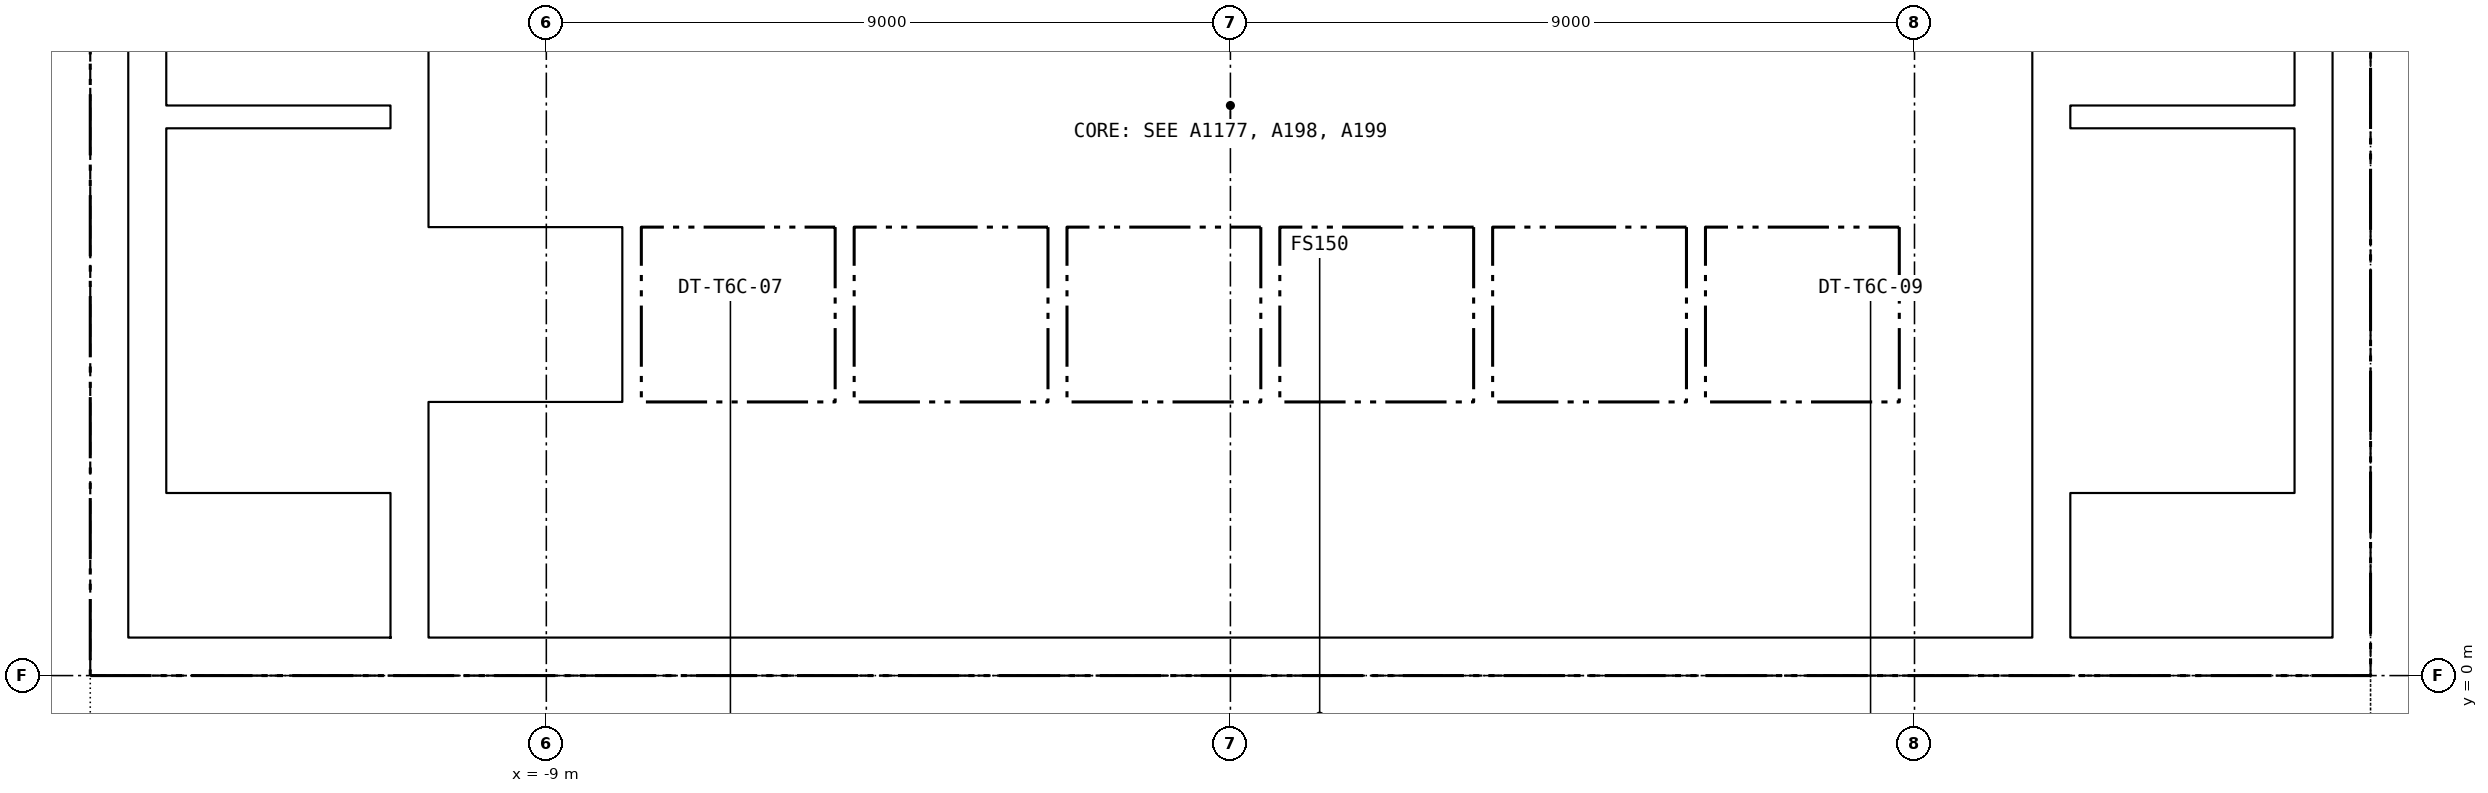
"""IFC4 building model, lengths in metres.
Left out: names, types, materials, properties, quantities, classifications, styles, units other than length and angle.
Written with IfcOpenShell. Run it as: python <this file> out.ifc"""

import sys

from ifc_helpers import new_model, si_unit, direction, frame, frame_2d, origin, place, context, subcontext, project, spatial, rectangle, extrude, element, fill, save


model = new_model("IFC4")
c1 = context("Model", 3, precision=1e-05, world=origin(), true_north=direction((0.0, 1.0)))
c2 = subcontext(c1, "Body", "Model", "MODEL_VIEW")
j1 = project(units=[si_unit("LENGTHUNIT", "METRE"), si_unit("PLANEANGLEUNIT", "RADIAN")], contexts=[c1])
p1 = place(None, origin())
s1 = spatial("IfcSite", under=j1, at=p1, CompositionType="ELEMENT")
p2 = place(p1, origin())
s2 = spatial("IfcBuilding", under=s1, at=p2, CompositionType="ELEMENT")
p3 = place(p2, frame((0.0, 0.0, 282.85)))
s3 = spatial("IfcBuildingStorey", under=s2, at=p3, CompositionType="ELEMENT", Elevation=282.85)
p4 = place(p3, frame((-15.0, 0.25, -0.15), z_axis=(0.0, 0.0, 1.0), x_axis=(1.0, 0.0, 0.0)))
e1 = element("IfcWall", 1, at=p4, inside=s3, PredefinedType="SOLIDWALL", context=c2, shape_type="SweptSolid", body=[
    extrude(rectangle(XDim=30.0, YDim=0.5, at=frame_2d((15.0, 0.0))), origin(), (0.0, 0.0, 1.0), 3.65),
])
p5 = place(p4, frame((5.8, 0.0, 0.15)))
e2 = element("IfcOpeningElement", 2, at=p5, cuts=e1, PredefinedType="OPENING", context=c2, shape_type="SweptSolid", body=[
    extrude(rectangle(XDim=2.4, YDim=2.4, at=frame_2d((1.2, 1.2))), frame((0.0, 0.26, 0.0), z_axis=(0.0, -1.0, 0.0), x_axis=(1.0, 0.0, 0.0)), (0.0, 0.0, 1.0), 0.52),
])
p6 = place(p4, frame((13.8, 0.0, 0.15)))
e3 = element("IfcOpeningElement", 3, at=p6, cuts=e1, PredefinedType="OPENING", context=c2, shape_type="SweptSolid", body=[
    extrude(rectangle(XDim=2.4, YDim=2.4, at=frame_2d((1.2, 1.2))), frame((0.0, 0.26, 0.0), z_axis=(0.0, -1.0, 0.0), x_axis=(1.0, 0.0, 0.0)), (0.0, 0.0, 1.0), 0.52),
])
p7 = place(p4, frame((21.8, 0.0, 0.15)))
e4 = element("IfcOpeningElement", 4, at=p7, cuts=e1, PredefinedType="OPENING", context=c2, shape_type="SweptSolid", body=[
    extrude(rectangle(XDim=2.4, YDim=2.4, at=frame_2d((1.2, 1.2))), frame((0.0, 0.26, 0.0), z_axis=(0.0, -1.0, 0.0), x_axis=(1.0, 0.0, 0.0)), (0.0, 0.0, 1.0), 0.52),
])
p8 = place(p4, frame((1.5, 0.0, 0.15)))
e5 = element("IfcOpeningElement", 5, at=p8, cuts=e1, PredefinedType="OPENING", context=c2, shape_type="SweptSolid", body=[
    extrude(rectangle(XDim=1.2, YDim=2.1, at=frame_2d((0.6, 1.05))), frame((0.0, 0.26, 0.0), z_axis=(0.0, -1.0, 0.0), x_axis=(1.0, 0.0, 0.0)), (0.0, 0.0, 1.0), 0.52),
])
p9 = place(p4, frame((27.3, 0.0, 0.15)))
e6 = element("IfcOpeningElement", 6, at=p9, cuts=e1, PredefinedType="OPENING", context=c2, shape_type="SweptSolid", body=[
    extrude(rectangle(XDim=1.2, YDim=2.1, at=frame_2d((0.6, 1.05))), frame((0.0, 0.26, 0.0), z_axis=(0.0, -1.0, 0.0), x_axis=(1.0, 0.0, 0.0)), (0.0, 0.0, 1.0), 0.52),
])
for number, where, z_axis, x_axis in (
    (7, (-14.75, 0.5, -0.15), (0.0, 0.0, 1.0), (0.0, 1.0, 0.0)),
    (8, (14.75, 0.5, -0.15), (0.0, 0.0, 1.0), (0.0, 1.0, 0.0)),
    (9, (-10.8, 0.5, -0.15), (0.0, 0.0, 1.0), (0.0, 1.0, 0.0)),
    (10, (10.8, 0.5, -0.15), (0.0, 0.0, 1.0), (0.0, 1.0, 0.0)),
):
    element("IfcWall", number, at=place(p3, frame(where, z_axis=z_axis, x_axis=x_axis)), inside=s3, PredefinedType="SOLIDWALL", context=c2, shape_type="SweptSolid", body=[
        extrude(rectangle(XDim=14.0, YDim=0.5, at=frame_2d((7.0, 0.0))), origin(), (0.0, 0.0, 1.0), 3.65),
    ])
p10 = place(p3, frame((-10.55, 3.5, 0.0), z_axis=(0.0, 0.0, 1.0), x_axis=(1.0, 0.0, 0.0)))
e11 = element("IfcWall", 11, at=p10, inside=s3, PredefinedType="PARTITIONING", context=c2, shape_type="SweptSolid", body=[
    extrude(rectangle(XDim=21.1, YDim=0.2, at=frame_2d((10.55, 0.0))), origin(), (0.0, 0.0, 1.0), 3.5),
])
p11 = place(p10, frame((0.675, 0.0, 0.0)))
e12 = element("IfcOpeningElement", 12, at=p11, cuts=e11, PredefinedType="OPENING", context=c2, shape_type="SweptSolid", body=[
    extrude(rectangle(XDim=1.2, YDim=2.1, at=frame_2d((0.6, 1.05))), frame((0.0, 0.11, 0.0), z_axis=(0.0, -1.0, 0.0), x_axis=(1.0, 0.0, 0.0)), (0.0, 0.0, 1.0), 0.22),
])
p12 = place(p10, frame((3.475, 0.0, 0.0)))
e13 = element("IfcOpeningElement", 13, at=p12, cuts=e11, PredefinedType="OPENING", context=c2, shape_type="SweptSolid", body=[
    extrude(rectangle(XDim=1.2, YDim=2.1, at=frame_2d((0.6, 1.05))), frame((0.0, 0.11, 0.0), z_axis=(0.0, -1.0, 0.0), x_axis=(1.0, 0.0, 0.0)), (0.0, 0.0, 1.0), 0.22),
])
p13 = place(p10, frame((6.275, 0.0, 0.0)))
e14 = element("IfcOpeningElement", 14, at=p13, cuts=e11, PredefinedType="OPENING", context=c2, shape_type="SweptSolid", body=[
    extrude(rectangle(XDim=1.2, YDim=2.1, at=frame_2d((0.6, 1.05))), frame((0.0, 0.11, 0.0), z_axis=(0.0, -1.0, 0.0), x_axis=(1.0, 0.0, 0.0)), (0.0, 0.0, 1.0), 0.22),
])
p14 = place(p10, frame((9.075, 0.0, 0.0)))
e15 = element("IfcOpeningElement", 15, at=p14, cuts=e11, PredefinedType="OPENING", context=c2, shape_type="SweptSolid", body=[
    extrude(rectangle(XDim=1.2, YDim=2.1, at=frame_2d((0.6, 1.05))), frame((0.0, 0.11, 0.0), z_axis=(0.0, -1.0, 0.0), x_axis=(1.0, 0.0, 0.0)), (0.0, 0.0, 1.0), 0.22),
])
p15 = place(p10, frame((11.875, 0.0, 0.0)))
e16 = element("IfcOpeningElement", 16, at=p15, cuts=e11, PredefinedType="OPENING", context=c2, shape_type="SweptSolid", body=[
    extrude(rectangle(XDim=1.2, YDim=2.1, at=frame_2d((0.6, 1.05))), frame((0.0, 0.11, 0.0), z_axis=(0.0, -1.0, 0.0), x_axis=(1.0, 0.0, 0.0)), (0.0, 0.0, 1.0), 0.22),
])
p16 = place(p10, frame((14.675, 0.0, 0.0)))
e17 = element("IfcOpeningElement", 17, at=p16, cuts=e11, PredefinedType="OPENING", context=c2, shape_type="SweptSolid", body=[
    extrude(rectangle(XDim=1.2, YDim=2.1, at=frame_2d((0.6, 1.05))), frame((0.0, 0.11, 0.0), z_axis=(0.0, -1.0, 0.0), x_axis=(1.0, 0.0, 0.0)), (0.0, 0.0, 1.0), 0.22),
])
p17 = place(p10, frame((17.475, 0.0, 0.0)))
e18 = element("IfcOpeningElement", 18, at=p17, cuts=e11, PredefinedType="OPENING", context=c2, shape_type="SweptSolid", body=[
    extrude(rectangle(XDim=1.2, YDim=2.1, at=frame_2d((0.6, 1.05))), frame((0.0, 0.11, 0.0), z_axis=(0.0, -1.0, 0.0), x_axis=(1.0, 0.0, 0.0)), (0.0, 0.0, 1.0), 0.22),
])
p18 = place(p10, frame((19.9, 0.0, 0.0)))
e19 = element("IfcOpeningElement", 19, at=p18, cuts=e11, PredefinedType="OPENING", context=c2, shape_type="SweptSolid", body=[
    extrude(rectangle(XDim=0.9, YDim=2.1, at=frame_2d((0.45, 1.05))), frame((0.0, 0.11, 0.0), z_axis=(0.0, -1.0, 0.0), x_axis=(1.0, 0.0, 0.0)), (0.0, 0.0, 1.0), 0.22),
])
p19 = place(p3, frame((-10.55, 6.025, 0.0), z_axis=(0.0, 0.0, 1.0), x_axis=(1.0, 0.0, 0.0)))
e20 = element("IfcWall", 20, at=p19, inside=s3, PredefinedType="PARTITIONING", context=c2, shape_type="SweptSolid", body=[
    extrude(rectangle(XDim=21.1, YDim=0.25, at=frame_2d((10.55, 0.0))), origin(), (0.0, 0.0, 1.0), 3.5),
])
p20 = place(p3, frame((-4.125, 6.15, 0.0), z_axis=(0.0, 0.0, 1.0), x_axis=(0.0, 1.0, 0.0)))
e21 = element("IfcWall", 21, at=p20, inside=s3, PredefinedType="PARTITIONING", context=c2, shape_type="SweptSolid", body=[
    extrude(rectangle(XDim=4.95, YDim=0.25, at=frame_2d((2.475, 0.0))), origin(), (0.0, 0.0, 1.0), 3.5),
])
p21 = place(p20, frame((3.125, 0.0, 0.0)))
e22 = element("IfcOpeningElement", 22, at=p21, cuts=e21, PredefinedType="OPENING", context=c2, shape_type="SweptSolid", body=[
    extrude(rectangle(XDim=1.2, YDim=2.1, at=frame_2d((0.6, 1.05))), frame((0.0, 0.135, 0.0), z_axis=(0.0, -1.0, 0.0), x_axis=(1.0, 0.0, 0.0)), (0.0, 0.0, 1.0), 0.27),
])
for number, where, z_axis, x_axis in (
    (23, (-7.875, 3.6, 0.0), (0.0, 0.0, 1.0), (0.0, 1.0, 0.0)),
    (24, (-5.075, 3.6, 0.0), (0.0, 0.0, 1.0), (0.0, 1.0, 0.0)),
    (25, (-2.275, 3.6, 0.0), (0.0, 0.0, 1.0), (0.0, 1.0, 0.0)),
    (26, (0.525, 3.6, 0.0), (0.0, 0.0, 1.0), (0.0, 1.0, 0.0)),
    (27, (3.325, 3.6, 0.0), (0.0, 0.0, 1.0), (0.0, 1.0, 0.0)),
    (28, (6.125, 3.6, 0.0), (0.0, 0.0, 1.0), (0.0, 1.0, 0.0)),
    (29, (8.925, 3.6, 0.0), (0.0, 0.0, 1.0), (0.0, 1.0, 0.0)),
):
    element("IfcWall", number, at=place(p3, frame(where, z_axis=z_axis, x_axis=x_axis)), inside=s3, PredefinedType="PARTITIONING", context=c2, shape_type="SweptSolid", body=[
        extrude(rectangle(XDim=2.3, YDim=0.25, at=frame_2d((1.15, 0.0))), origin(), (0.0, 0.0, 1.0), 3.5),
    ])
for number, where, z_axis, x_axis in (
    (30, (-0.35, 6.15, 0.0), (0.0, 0.0, 1.0), (0.0, 1.0, 0.0)),
    (31, (3.1, 6.15, 0.0), (0.0, 0.0, 1.0), (0.0, 1.0, 0.0)),
):
    element("IfcWall", number, at=place(p3, frame(where, z_axis=z_axis, x_axis=x_axis)), inside=s3, PredefinedType="PARTITIONING", context=c2, shape_type="SweptSolid", body=[
        extrude(rectangle(XDim=2.3, YDim=0.15, at=frame_2d((1.15, 0.0))), origin(), (0.0, 0.0, 1.0), 3.5),
    ])
p22 = place(p3, frame((8.925, 6.15, 0.0), z_axis=(0.0, 0.0, 1.0), x_axis=(0.0, 1.0, 0.0)))
e32 = element("IfcWall", 32, at=p22, inside=s3, PredefinedType="PARTITIONING", context=c2, shape_type="SweptSolid", body=[
    extrude(rectangle(XDim=2.3, YDim=0.25, at=frame_2d((1.15, 0.0))), origin(), (0.0, 0.0, 1.0), 3.5),
])
p23 = place(p3, frame((-14.0, 7.35, 0.0), z_axis=(0.0, 0.0, 1.0), x_axis=(1.0, 0.0, 0.0)))
e33 = element("IfcWall", 33, at=p23, inside=s3, PredefinedType="SOLIDWALL", context=c2, shape_type="SweptSolid", body=[
    extrude(rectangle(XDim=2.95, YDim=0.3, at=frame_2d((1.475, 0.0))), origin(), (0.0, 0.0, 1.0), 3.5),
])
p24 = place(p3, frame((-14.25, 0.5, 0.0), z_axis=(0.0, 0.0, 1.0), x_axis=(0.0, 1.0, 0.0)))
e34 = element("IfcWall", 34, at=p24, inside=s3, PredefinedType="SOLIDWALL", context=c2, shape_type="SweptSolid", body=[
    extrude(rectangle(XDim=14.0, YDim=0.5, at=frame_2d((7.0, 0.0))), origin(), (0.0, 0.0, 1.0), 3.5),
])
p25 = place(p3, frame((11.05, 7.35, 0.0), z_axis=(0.0, 0.0, 1.0), x_axis=(1.0, 0.0, 0.0)))
e35 = element("IfcWall", 35, at=p25, inside=s3, PredefinedType="SOLIDWALL", context=c2, shape_type="SweptSolid", body=[
    extrude(rectangle(XDim=2.95, YDim=0.3, at=frame_2d((1.475, 0.0))), origin(), (0.0, 0.0, 1.0), 3.5),
])
p26 = place(p3, frame((14.25, 0.5, 0.0), z_axis=(0.0, 0.0, 1.0), x_axis=(0.0, 1.0, 0.0)))
e36 = element("IfcWall", 36, at=p26, inside=s3, PredefinedType="SOLIDWALL", context=c2, shape_type="SweptSolid", body=[
    extrude(rectangle(XDim=14.0, YDim=0.5, at=frame_2d((7.0, 0.0))), origin(), (0.0, 0.0, 1.0), 3.5),
])
p27 = place(p11, origin())
e37 = element("IfcDoor", 37, at=p27, inside=s3, OperationType="DOUBLE_DOOR_SLIDING", PredefinedType="DOOR", context=c2, shape_type="SweptSolid", body=[
    extrude(rectangle(XDim=1.2, YDim=2.1, at=frame_2d((0.6, 1.05))), frame((0.0, 0.025, 0.0), z_axis=(0.0, -1.0, 0.0), x_axis=(1.0, 0.0, 0.0)), (0.0, 0.0, 1.0), 0.05),
])
fill(e12, e37)
p28 = place(p12, origin())
e38 = element("IfcDoor", 38, at=p28, inside=s3, OperationType="DOUBLE_DOOR_SLIDING", PredefinedType="DOOR", context=c2, shape_type="SweptSolid", body=[
    extrude(rectangle(XDim=1.2, YDim=2.1, at=frame_2d((0.6, 1.05))), frame((0.0, 0.025, 0.0), z_axis=(0.0, -1.0, 0.0), x_axis=(1.0, 0.0, 0.0)), (0.0, 0.0, 1.0), 0.05),
])
fill(e13, e38)
p29 = place(p13, origin())
e39 = element("IfcDoor", 39, at=p29, inside=s3, OperationType="DOUBLE_DOOR_SLIDING", PredefinedType="DOOR", context=c2, shape_type="SweptSolid", body=[
    extrude(rectangle(XDim=1.2, YDim=2.1, at=frame_2d((0.6, 1.05))), frame((0.0, 0.025, 0.0), z_axis=(0.0, -1.0, 0.0), x_axis=(1.0, 0.0, 0.0)), (0.0, 0.0, 1.0), 0.05),
])
fill(e14, e39)
p30 = place(p14, origin())
e40 = element("IfcDoor", 40, at=p30, inside=s3, OperationType="DOUBLE_DOOR_SLIDING", PredefinedType="DOOR", context=c2, shape_type="SweptSolid", body=[
    extrude(rectangle(XDim=1.2, YDim=2.1, at=frame_2d((0.6, 1.05))), frame((0.0, 0.025, 0.0), z_axis=(0.0, -1.0, 0.0), x_axis=(1.0, 0.0, 0.0)), (0.0, 0.0, 1.0), 0.05),
])
fill(e15, e40)
p31 = place(p15, origin())
e41 = element("IfcDoor", 41, at=p31, inside=s3, OperationType="DOUBLE_DOOR_SLIDING", PredefinedType="DOOR", context=c2, shape_type="SweptSolid", body=[
    extrude(rectangle(XDim=1.2, YDim=2.1, at=frame_2d((0.6, 1.05))), frame((0.0, 0.025, 0.0), z_axis=(0.0, -1.0, 0.0), x_axis=(1.0, 0.0, 0.0)), (0.0, 0.0, 1.0), 0.05),
])
fill(e16, e41)
p32 = place(p16, origin())
e42 = element("IfcDoor", 42, at=p32, inside=s3, OperationType="DOUBLE_DOOR_SLIDING", PredefinedType="DOOR", context=c2, shape_type="SweptSolid", body=[
    extrude(rectangle(XDim=1.2, YDim=2.1, at=frame_2d((0.6, 1.05))), frame((0.0, 0.025, 0.0), z_axis=(0.0, -1.0, 0.0), x_axis=(1.0, 0.0, 0.0)), (0.0, 0.0, 1.0), 0.05),
])
fill(e17, e42)
p33 = place(p17, origin())
e43 = element("IfcDoor", 43, at=p33, inside=s3, OperationType="DOUBLE_DOOR_SLIDING", PredefinedType="DOOR", context=c2, shape_type="SweptSolid", body=[
    extrude(rectangle(XDim=1.2, YDim=2.1, at=frame_2d((0.6, 1.05))), frame((0.0, 0.025, 0.0), z_axis=(0.0, -1.0, 0.0), x_axis=(1.0, 0.0, 0.0)), (0.0, 0.0, 1.0), 0.05),
])
fill(e18, e43)
p34 = place(p18, origin())
e44 = element("IfcDoor", 44, at=p34, inside=s3, OperationType="SINGLE_SWING_RIGHT", PredefinedType="DOOR", context=c2, shape_type="SweptSolid", body=[
    extrude(rectangle(XDim=0.9, YDim=2.1, at=frame_2d((0.45, 1.05))), frame((0.0, 0.025, 0.0), z_axis=(0.0, -1.0, 0.0), x_axis=(1.0, 0.0, 0.0)), (0.0, 0.0, 1.0), 0.05),
])
fill(e19, e44)
p35 = place(p5, origin())
e45 = element("IfcDoor", 45, at=p35, inside=s3, OperationType="DOUBLE_DOOR_DOUBLE_SWING", PredefinedType="DOOR", context=c2, shape_type="SweptSolid", body=[
    extrude(rectangle(XDim=2.4, YDim=2.4, at=frame_2d((1.2, 1.2))), frame((0.0, 0.025, 0.0), z_axis=(0.0, -1.0, 0.0), x_axis=(1.0, 0.0, 0.0)), (0.0, 0.0, 1.0), 0.05),
])
fill(e2, e45)
p36 = place(p6, origin())
e46 = element("IfcDoor", 46, at=p36, inside=s3, OperationType="DOUBLE_DOOR_DOUBLE_SWING", PredefinedType="DOOR", context=c2, shape_type="SweptSolid", body=[
    extrude(rectangle(XDim=2.4, YDim=2.4, at=frame_2d((1.2, 1.2))), frame((0.0, 0.025, 0.0), z_axis=(0.0, -1.0, 0.0), x_axis=(1.0, 0.0, 0.0)), (0.0, 0.0, 1.0), 0.05),
])
fill(e3, e46)
p37 = place(p7, origin())
e47 = element("IfcDoor", 47, at=p37, inside=s3, OperationType="DOUBLE_DOOR_DOUBLE_SWING", PredefinedType="DOOR", context=c2, shape_type="SweptSolid", body=[
    extrude(rectangle(XDim=2.4, YDim=2.4, at=frame_2d((1.2, 1.2))), frame((0.0, 0.025, 0.0), z_axis=(0.0, -1.0, 0.0), x_axis=(1.0, 0.0, 0.0)), (0.0, 0.0, 1.0), 0.05),
])
fill(e4, e47)
p38 = place(p8, origin())
e48 = element("IfcDoor", 48, at=p38, inside=s3, OperationType="SINGLE_SWING_LEFT", PredefinedType="DOOR", context=c2, shape_type="SweptSolid", body=[
    extrude(rectangle(XDim=1.2, YDim=2.1, at=frame_2d((0.6, 1.05))), frame((0.0, 0.025, 0.0), z_axis=(0.0, -1.0, 0.0), x_axis=(1.0, 0.0, 0.0)), (0.0, 0.0, 1.0), 0.05),
])
fill(e5, e48)
p39 = place(p9, origin())
e49 = element("IfcDoor", 49, at=p39, inside=s3, OperationType="SINGLE_SWING_RIGHT", PredefinedType="DOOR", context=c2, shape_type="SweptSolid", body=[
    extrude(rectangle(XDim=1.2, YDim=2.1, at=frame_2d((0.6, 1.05))), frame((0.0, 0.025, 0.0), z_axis=(0.0, -1.0, 0.0), x_axis=(1.0, 0.0, 0.0)), (0.0, 0.0, 1.0), 0.05),
])
fill(e6, e49)
save(model, sys.argv[1])
